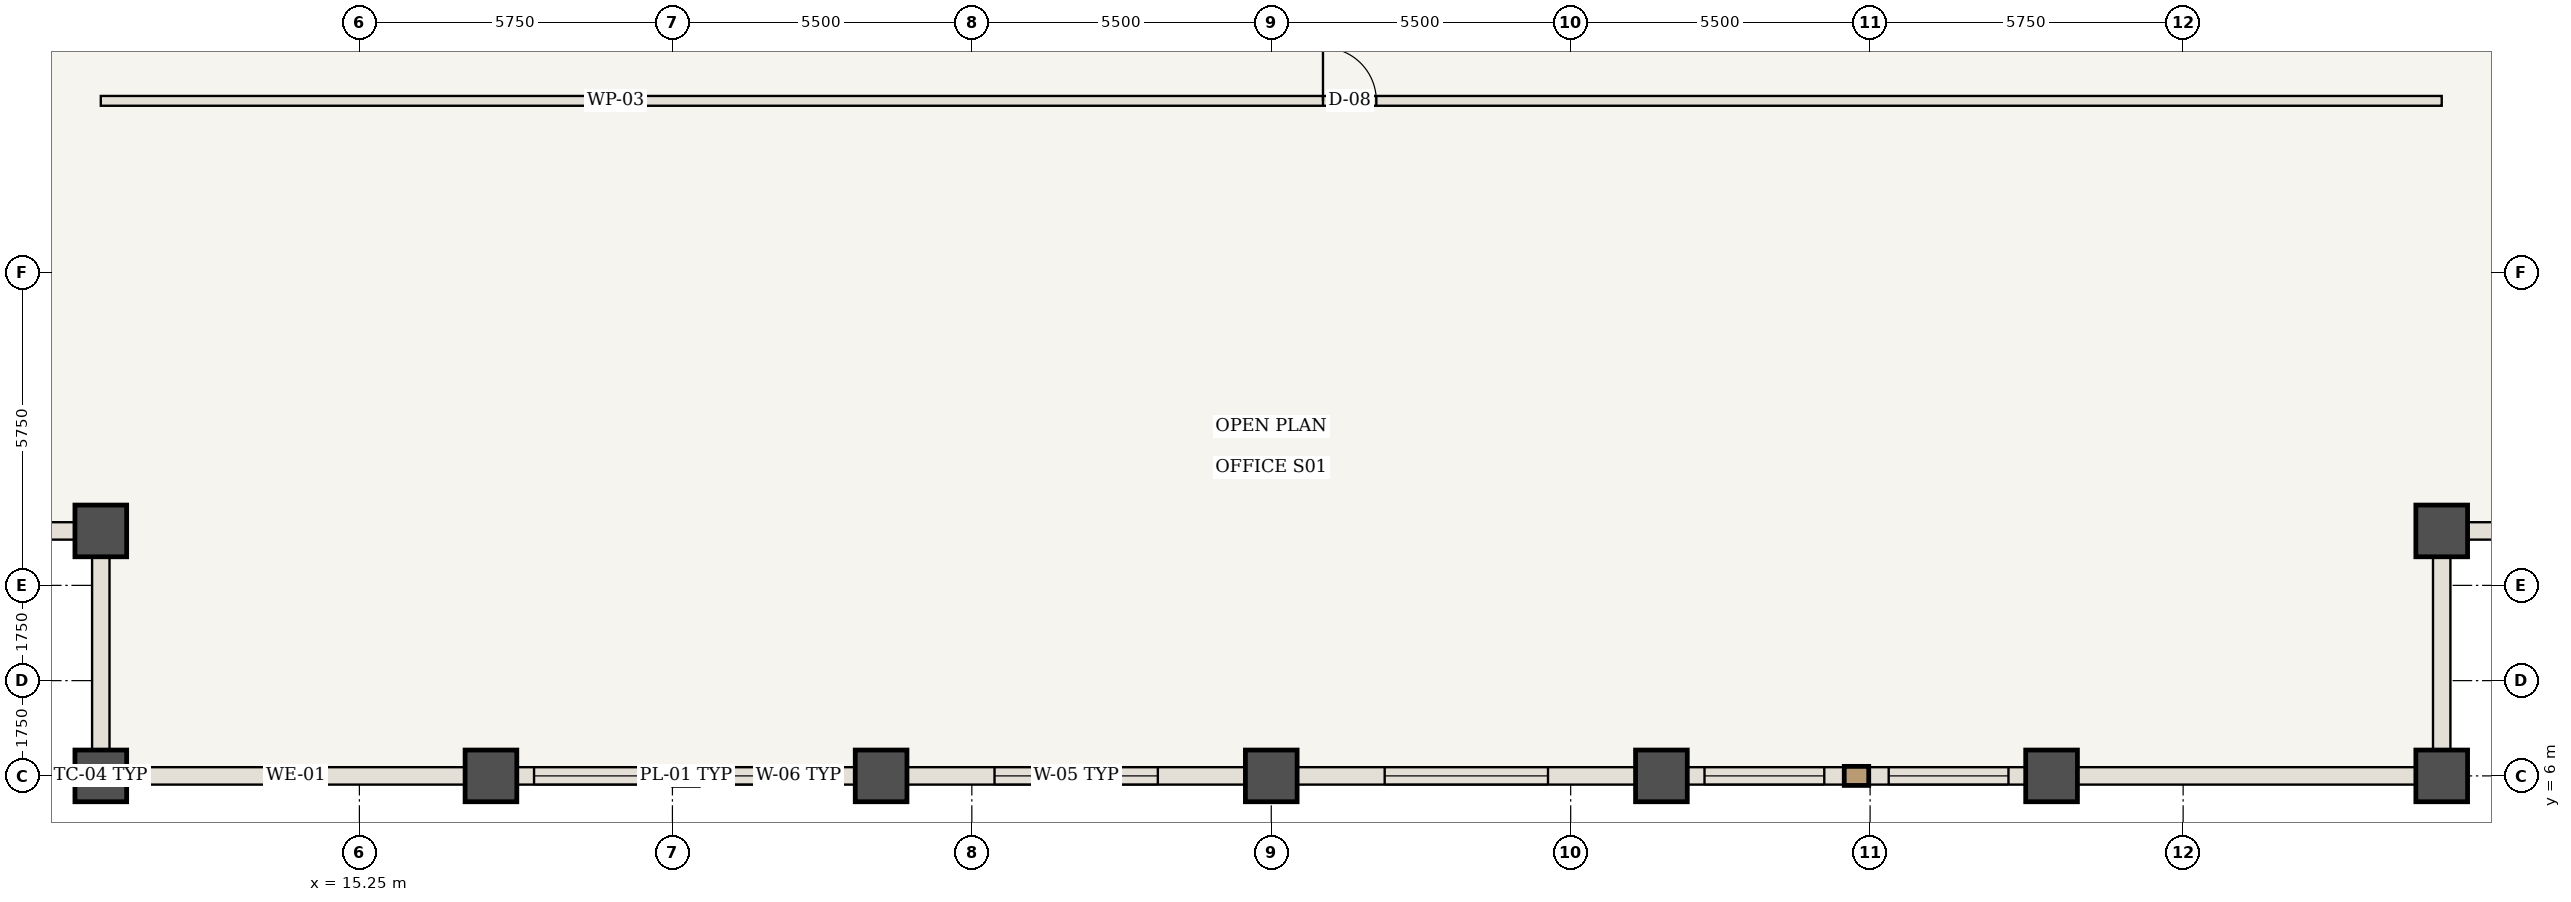
"""IFC4 building model, lengths in metres.
Left out: names, types, materials, properties, quantities, classifications, styles, units other than length and angle.
Written with IfcOpenShell. Run it as: python <this file> out.ifc"""

import sys

from ifc_helpers import new_model, si_unit, direction, frame, frame_2d, origin, origin_2d, place, context, subcontext, project, spatial, rectangle, extrude, element, fill, save


model = new_model("IFC4")
c1 = context("Model", 3, precision=1e-05, world=origin(), true_north=direction((0.0, 1.0)))
c2 = subcontext(c1, "Body", "Model", "MODEL_VIEW")
j1 = project(units=[si_unit("LENGTHUNIT", "METRE"), si_unit("PLANEANGLEUNIT", "RADIAN")], contexts=[c1])
p1 = place(None, origin())
s1 = spatial("IfcSite", under=j1, at=p1, CompositionType="ELEMENT")
p2 = place(p1, origin())
s2 = spatial("IfcBuilding", under=s1, at=p2, CompositionType="ELEMENT")
p3 = place(p2, frame((0.0, 0.0, 114.45)))
s3 = spatial("IfcBuildingStorey", under=s2, at=p3, CompositionType="ELEMENT", Elevation=114.45)
for number, where, z_axis, x_axis in (
    (1, (10.5, 6.0, 0.0), (0.0, 0.0, 1.0), (1.0, 0.0, 0.0)),
    (2, (10.5, 10.5, 0.0), (0.0, 0.0, 1.0), (1.0, 0.0, 0.0)),
    (3, (53.5, 6.0, 0.0), (0.0, 0.0, 1.0), (1.0, 0.0, 0.0)),
    (4, (53.5, 10.5, 0.0), (0.0, 0.0, 1.0), (1.0, 0.0, 0.0)),
    (5, (17.667, 6.0, 0.0), (0.0, 0.0, 1.0), (1.0, 0.0, 0.0)),
    (6, (24.833, 6.0, 0.0), (0.0, 0.0, 1.0), (1.0, 0.0, 0.0)),
    (7, (32.0, 6.0, 0.0), (0.0, 0.0, 1.0), (1.0, 0.0, 0.0)),
    (8, (39.167, 6.0, 0.0), (0.0, 0.0, 1.0), (1.0, 0.0, 0.0)),
    (9, (46.333, 6.0, 0.0), (0.0, 0.0, 1.0), (1.0, 0.0, 0.0)),
):
    element("IfcColumn", number, at=place(p3, frame(where, z_axis=z_axis, x_axis=x_axis)), inside=s3, PredefinedType="COLUMN", context=c2, shape_type="SweptSolid", body=[
        extrude(rectangle(XDim=0.95, YDim=0.95, at=origin_2d()), origin(), (0.0, 0.0, 1.0), 3.85),
    ])
p4 = place(p3, frame((10.5, 18.4, 0.0), z_axis=(0.0, 0.0, 1.0), x_axis=(1.0, 0.0, 0.0)))
e10 = element("IfcWall", 10, at=p4, inside=s3, PredefinedType="STANDARD", context=c2, shape_type="SweptSolid", body=[
    extrude(rectangle(XDim=43.0, YDim=0.18, at=frame_2d((21.5, 0.0))), origin(), (0.0, 0.0, 1.0), 3.685),
])
p5 = place(p4, frame((22.45, 0.0, 0.0)))
e11 = element("IfcOpeningElement", 11, at=p5, cuts=e10, PredefinedType="OPENING", context=c2, shape_type="SweptSolid", body=[
    extrude(rectangle(XDim=0.98, YDim=2.2, at=frame_2d((0.49, 1.1))), frame((0.0, 0.1, 0.0), z_axis=(0.0, -1.0, 0.0), x_axis=(1.0, 0.0, 0.0)), (0.0, 0.0, 1.0), 0.2),
])
p6 = place(p3, frame((17.667, 6.0, 0.0), z_axis=(0.0, 0.0, 1.0), x_axis=(-1.0, 0.0, 0.0)))
e12 = element("IfcWall", 12, at=p6, inside=s3, PredefinedType="USERDEFINED", context=c2, shape_type="SweptSolid", body=[
    extrude(rectangle(XDim=7.167, YDim=0.32, at=frame_2d((3.583, 0.0))), origin(), (0.0, 0.0, 1.0), 2.885),
])
p7 = place(p3, frame((24.833, 6.0, 0.0), z_axis=(0.0, 0.0, 1.0), x_axis=(-1.0, 0.0, 0.0)))
e13 = element("IfcWall", 13, at=p7, inside=s3, PredefinedType="USERDEFINED", context=c2, shape_type="SweptSolid", body=[
    extrude(rectangle(XDim=7.167, YDim=0.32, at=frame_2d((3.583, 0.0))), origin(), (0.0, 0.0, 1.0), 2.885),
])
p8 = place(p7, frame((0.792, 0.0, 0.85)))
e14 = element("IfcOpeningElement", 14, at=p8, cuts=e13, PredefinedType="OPENING", context=c2, shape_type="SweptSolid", body=[
    extrude(rectangle(XDim=2.2, YDim=1.835, at=frame_2d((1.1, 0.917))), frame((0.0, 0.17, 0.0), z_axis=(0.0, -1.0, 0.0), x_axis=(1.0, 0.0, 0.0)), (0.0, 0.0, 1.0), 0.34),
])
p9 = place(p7, frame((4.175, 0.0, 0.85)))
e15 = element("IfcOpeningElement", 15, at=p9, cuts=e13, PredefinedType="OPENING", context=c2, shape_type="SweptSolid", body=[
    extrude(rectangle(XDim=2.2, YDim=1.835, at=frame_2d((1.1, 0.917))), frame((0.0, 0.17, 0.0), z_axis=(0.0, -1.0, 0.0), x_axis=(1.0, 0.0, 0.0)), (0.0, 0.0, 1.0), 0.34),
])
p10 = place(p3, frame((32.0, 6.0, 0.0), z_axis=(0.0, 0.0, 1.0), x_axis=(-1.0, 0.0, 0.0)))
e16 = element("IfcWall", 16, at=p10, inside=s3, PredefinedType="USERDEFINED", context=c2, shape_type="SweptSolid", body=[
    extrude(rectangle(XDim=7.167, YDim=0.32, at=frame_2d((3.583, 0.0))), origin(), (0.0, 0.0, 1.0), 2.885),
])
p11 = place(p10, frame((2.083, 0.0, 0.85)))
e17 = element("IfcOpeningElement", 17, at=p11, cuts=e16, PredefinedType="OPENING", context=c2, shape_type="SweptSolid", body=[
    extrude(rectangle(XDim=3.0, YDim=1.835, at=frame_2d((1.5, 0.917))), frame((0.0, 0.17, 0.0), z_axis=(0.0, -1.0, 0.0), x_axis=(1.0, 0.0, 0.0)), (0.0, 0.0, 1.0), 0.34),
])
p12 = place(p3, frame((39.167, 6.0, 0.0), z_axis=(0.0, 0.0, 1.0), x_axis=(-1.0, 0.0, 0.0)))
e18 = element("IfcWall", 18, at=p12, inside=s3, PredefinedType="USERDEFINED", context=c2, shape_type="SweptSolid", body=[
    extrude(rectangle(XDim=7.167, YDim=0.32, at=frame_2d((3.583, 0.0))), origin(), (0.0, 0.0, 1.0), 2.885),
])
p13 = place(p12, frame((2.083, 0.0, 0.85)))
e19 = element("IfcOpeningElement", 19, at=p13, cuts=e18, PredefinedType="OPENING", context=c2, shape_type="SweptSolid", body=[
    extrude(rectangle(XDim=3.0, YDim=1.835, at=frame_2d((1.5, 0.917))), frame((0.0, 0.17, 0.0), z_axis=(0.0, -1.0, 0.0), x_axis=(1.0, 0.0, 0.0)), (0.0, 0.0, 1.0), 0.34),
])
p14 = place(p3, frame((46.333, 6.0, 0.0), z_axis=(0.0, 0.0, 1.0), x_axis=(-1.0, 0.0, 0.0)))
e20 = element("IfcWall", 20, at=p14, inside=s3, PredefinedType="USERDEFINED", context=c2, shape_type="SweptSolid", body=[
    extrude(rectangle(XDim=7.167, YDim=0.32, at=frame_2d((3.583, 0.0))), origin(), (0.0, 0.0, 1.0), 2.885),
])
p15 = place(p14, frame((0.792, 0.0, 0.85)))
e21 = element("IfcOpeningElement", 21, at=p15, cuts=e20, PredefinedType="OPENING", context=c2, shape_type="SweptSolid", body=[
    extrude(rectangle(XDim=2.2, YDim=1.835, at=frame_2d((1.1, 0.917))), frame((0.0, 0.17, 0.0), z_axis=(0.0, -1.0, 0.0), x_axis=(1.0, 0.0, 0.0)), (0.0, 0.0, 1.0), 0.34),
])
p16 = place(p14, frame((4.175, 0.0, 0.85)))
e22 = element("IfcOpeningElement", 22, at=p16, cuts=e20, PredefinedType="OPENING", context=c2, shape_type="SweptSolid", body=[
    extrude(rectangle(XDim=2.2, YDim=1.835, at=frame_2d((1.1, 0.917))), frame((0.0, 0.17, 0.0), z_axis=(0.0, -1.0, 0.0), x_axis=(1.0, 0.0, 0.0)), (0.0, 0.0, 1.0), 0.34),
])
p17 = place(p3, frame((53.5, 6.0, 0.0), z_axis=(0.0, 0.0, 1.0), x_axis=(-1.0, 0.0, 0.0)))
e23 = element("IfcWall", 23, at=p17, inside=s3, PredefinedType="USERDEFINED", context=c2, shape_type="SweptSolid", body=[
    extrude(rectangle(XDim=7.167, YDim=0.32, at=frame_2d((3.583, 0.0))), origin(), (0.0, 0.0, 1.0), 2.885),
])
for number, where, z_axis, x_axis in (
    (24, (10.5, 6.0, 0.0), (0.0, 0.0, 1.0), (0.0, 1.0, 0.0)),
    (25, (10.5, 10.5, 0.0), (0.0, 0.0, 1.0), (-1.0, 0.0, 0.0)),
    (26, (53.5, 10.5, 0.0), (0.0, 0.0, 1.0), (0.0, -1.0, 0.0)),
    (27, (58.0, 10.5, 0.0), (0.0, 0.0, 1.0), (-1.0, 0.0, 0.0)),
):
    element("IfcWall", number, at=place(p3, frame(where, z_axis=z_axis, x_axis=x_axis)), inside=s3, PredefinedType="USERDEFINED", context=c2, shape_type="SweptSolid", body=[
        extrude(rectangle(XDim=4.5, YDim=0.32, at=frame_2d((2.25, 0.0))), origin(), (0.0, 0.0, 1.0), 2.885),
    ])
p18 = place(p5, origin())
e28 = element("IfcDoor", 28, at=p18, inside=s3, OperationType="SINGLE_SWING_LEFT", PredefinedType="DOOR", context=c2, shape_type="SweptSolid", body=[
    extrude(rectangle(XDim=0.98, YDim=2.2, at=frame_2d((0.49, 1.1))), frame((0.0, 0.025, 0.0), z_axis=(0.0, -1.0, 0.0), x_axis=(1.0, 0.0, 0.0)), (0.0, 0.0, 1.0), 0.05),
])
fill(e11, e28)
p19 = place(p8, origin())
e29 = element("IfcWindow", 29, at=p19, inside=s3, PartitioningType="SINGLE_PANEL", PredefinedType="WINDOW", context=c2, shape_type="SweptSolid", body=[
    extrude(rectangle(XDim=2.2, YDim=1.835, at=frame_2d((1.1, 0.917))), frame((0.0, 0.03, 0.0), z_axis=(0.0, -1.0, 0.0), x_axis=(1.0, 0.0, 0.0)), (0.0, 0.0, 1.0), 0.06),
])
fill(e14, e29)
p20 = place(p9, origin())
e30 = element("IfcWindow", 30, at=p20, inside=s3, PartitioningType="SINGLE_PANEL", PredefinedType="WINDOW", context=c2, shape_type="SweptSolid", body=[
    extrude(rectangle(XDim=2.2, YDim=1.835, at=frame_2d((1.1, 0.917))), frame((0.0, 0.03, 0.0), z_axis=(0.0, -1.0, 0.0), x_axis=(1.0, 0.0, 0.0)), (0.0, 0.0, 1.0), 0.06),
])
fill(e15, e30)
p21 = place(p11, origin())
e31 = element("IfcWindow", 31, at=p21, inside=s3, PartitioningType="SINGLE_PANEL", PredefinedType="WINDOW", context=c2, shape_type="SweptSolid", body=[
    extrude(rectangle(XDim=3.0, YDim=1.835, at=frame_2d((1.5, 0.917))), frame((0.0, 0.03, 0.0), z_axis=(0.0, -1.0, 0.0), x_axis=(1.0, 0.0, 0.0)), (0.0, 0.0, 1.0), 0.06),
])
fill(e17, e31)
p22 = place(p13, origin())
e32 = element("IfcWindow", 32, at=p22, inside=s3, PartitioningType="SINGLE_PANEL", PredefinedType="WINDOW", context=c2, shape_type="SweptSolid", body=[
    extrude(rectangle(XDim=3.0, YDim=1.835, at=frame_2d((1.5, 0.917))), frame((0.0, 0.03, 0.0), z_axis=(0.0, -1.0, 0.0), x_axis=(1.0, 0.0, 0.0)), (0.0, 0.0, 1.0), 0.06),
])
fill(e19, e32)
p23 = place(p15, origin())
e33 = element("IfcWindow", 33, at=p23, inside=s3, PartitioningType="SINGLE_PANEL", PredefinedType="WINDOW", context=c2, shape_type="SweptSolid", body=[
    extrude(rectangle(XDim=2.2, YDim=1.835, at=frame_2d((1.1, 0.917))), frame((0.0, 0.03, 0.0), z_axis=(0.0, -1.0, 0.0), x_axis=(1.0, 0.0, 0.0)), (0.0, 0.0, 1.0), 0.06),
])
fill(e21, e33)
p24 = place(p16, origin())
e34 = element("IfcWindow", 34, at=p24, inside=s3, PartitioningType="SINGLE_PANEL", PredefinedType="WINDOW", context=c2, shape_type="SweptSolid", body=[
    extrude(rectangle(XDim=2.2, YDim=1.835, at=frame_2d((1.1, 0.917))), frame((0.0, 0.03, 0.0), z_axis=(0.0, -1.0, 0.0), x_axis=(1.0, 0.0, 0.0)), (0.0, 0.0, 1.0), 0.06),
])
fill(e22, e34)
save(model, sys.argv[1])
